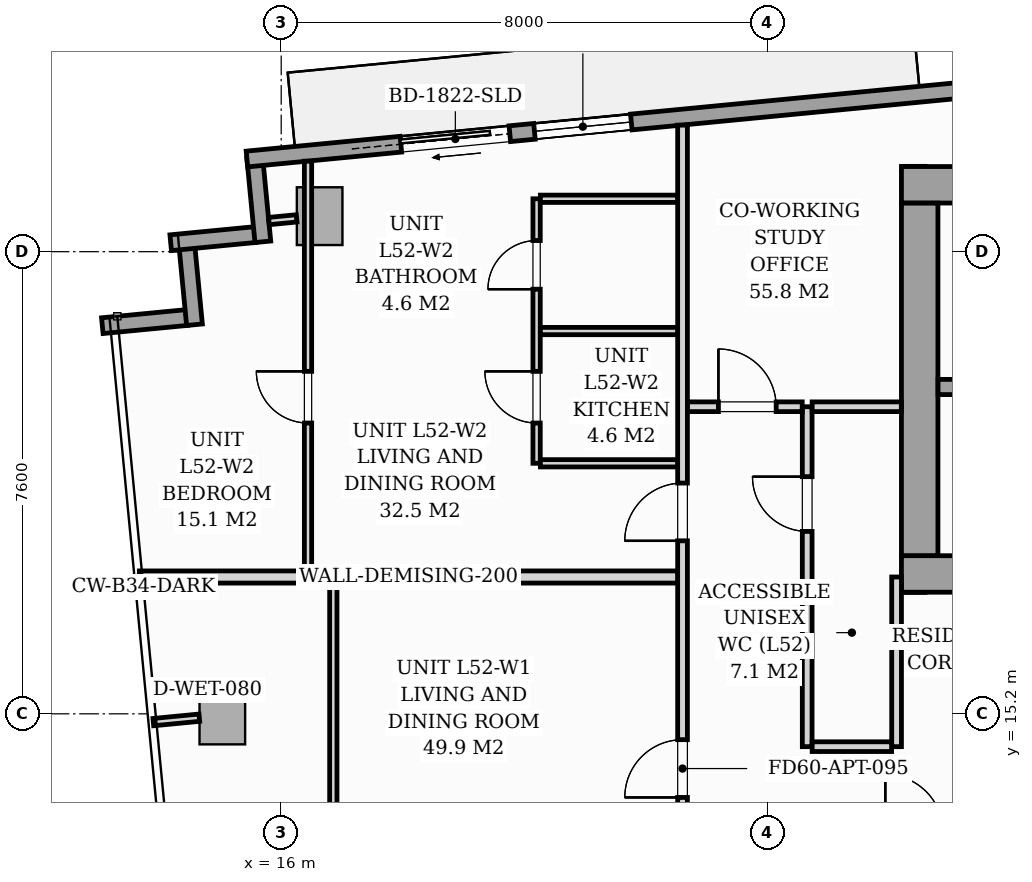
"""IFC4 building model, lengths in metres.
Left out: names, types, materials, properties, quantities, classifications, styles, units other than length and angle.
Written with IfcOpenShell. Run it as: python <this file> out.ifc"""

import sys

from ifc_helpers import new_model, si_unit, direction, frame, frame_2d, origin, origin_2d, place, context, subcontext, project, spatial, rectangle, i_section, extrude, source, transform, mapped, element, fill, save


model = new_model("IFC4")
c1 = context("Model", 3, precision=1e-05, world=origin(), true_north=direction((0.0, 1.0)))
c2 = subcontext(c1, "Body", "Model", "MODEL_VIEW")
j1 = project(units=[si_unit("LENGTHUNIT", "METRE"), si_unit("PLANEANGLEUNIT", "RADIAN")], contexts=[c1])
p1 = place(None, origin())
s1 = spatial("IfcSite", under=j1, at=p1, CompositionType="ELEMENT")
p2 = place(p1, origin())
s2 = spatial("IfcBuilding", under=s1, at=p2, CompositionType="ELEMENT")
p3 = place(p2, frame((0.0, 0.0, 182.6)))
s3 = spatial("IfcBuildingStorey", under=s2, at=p3, CompositionType="ELEMENT", Elevation=182.6)
m1 = source(origin(), c2, "Body", "SweptSolid", [
    extrude(i_section(OverallWidth=0.416, OverallDepth=0.446, WebThickness=0.039, FlangeThickness=0.063, FilletRadius=0.018, at=origin_2d()), origin(), (0.0, 0.0, 1.0), 3.196),
])
for number, where, z_axis, x_axis in (
    (1, (26.4, 17.4, 0.002), (0.0, 0.0, 1.0), (1.0, 0.0, 0.0)),
    (2, (26.4, 24.0, 0.002), (0.0, 0.0, 1.0), (1.0, 0.0, 0.0)),
):
    element("IfcColumn", number, at=place(p3, frame(where, z_axis=z_axis, x_axis=x_axis)), inside=s3, PredefinedType="PILASTER", context=c2, shape_type="MappedRepresentation", body=[
        mapped(m1, transform((0.0, 0.0, 0.0), scale=1.0)),
    ])
m2 = source(origin(), c2, "Body", "SweptSolid", [
    extrude(rectangle(XDim=0.75, YDim=0.95, at=origin_2d()), origin(), (0.0, 0.0, 1.0), 3.196),
])
for number, where, z_axis, x_axis in (
    (3, (16.632, 23.384, 0.002), (0.0, 0.0, 1.0), (0.995, 0.096, 0.0)),
    (4, (15.032, 15.173, 0.002), (0.0, 0.0, 1.0), (0.995, 0.096, 0.0)),
):
    element("IfcColumn", number, at=place(p3, frame(where, z_axis=z_axis, x_axis=x_axis)), inside=s3, PredefinedType="COLUMN", context=c2, shape_type="MappedRepresentation", body=[
        mapped(m2, transform((0.0, 0.0, 0.0), scale=1.0)),
    ])
p4 = place(p3, frame((13.058, 21.583, 0.0), z_axis=(0.0, 0.0, 1.0), x_axis=(0.99540774648, 0.095725744959, 0.0)))
e5 = element("IfcWall", 5, at=p4, inside=s3, PredefinedType="STANDARD", context=c2, shape_type="SweptSolid", body=[
    extrude(rectangle(XDim=1.395, YDim=0.26, at=frame_2d((0.698, 0.0))), origin(), (0.0, 0.0, 1.0), 2.94),
])
for number, where, z_axis, x_axis in (
    (6, (14.574, 21.599, 0.0), (0.0, 0.0, 1.0), (-0.096, 0.995, 0.0)),
    (7, (14.183, 22.947, 0.0), (0.0, 0.0, 1.0), (0.995, 0.096, 0.0)),
):
    element("IfcWall", number, at=place(p3, frame(where, z_axis=z_axis, x_axis=x_axis)), inside=s3, PredefinedType="STANDARD", context=c2, shape_type="SweptSolid", body=[
        extrude(rectangle(XDim=1.395, YDim=0.26, at=frame_2d((0.697, 0.0))), origin(), (0.0, 0.0, 1.0), 2.94),
    ])
p5 = place(p3, frame((15.698, 22.963, 0.0), z_axis=(0.0, 0.0, 1.0), x_axis=(-0.09589913835, 0.995391056452, 0.0)))
e8 = element("IfcWall", 8, at=p5, inside=s3, PredefinedType="STANDARD", context=c2, shape_type="SweptSolid", body=[
    extrude(rectangle(XDim=1.395, YDim=0.26, at=frame_2d((0.698, 0.0))), origin(), (0.0, 0.0, 1.0), 2.94),
])
p6 = place(p3, frame((15.437, 24.324, 0.0), z_axis=(0.0, 0.0, 1.0), x_axis=(0.995395627913, 0.095851676732, 0.0)))
e9 = element("IfcWall", 9, at=p6, inside=s3, PredefinedType="STANDARD", context=c2, shape_type="SweptSolid", body=[
    extrude(rectangle(XDim=16.1, YDim=0.26, at=frame_2d((8.05, 0.0))), origin(), (0.0, 0.0, 1.0), 2.94),
])
p7 = place(p6, frame((2.543, 0.0, 0.0)))
e10 = element("IfcOpeningElement", 10, at=p7, cuts=e9, PredefinedType="OPENING", context=c2, shape_type="SweptSolid", body=[
    extrude(rectangle(XDim=1.8, YDim=2.06, at=frame_2d((0.9, 1.03))), frame((0.0, 0.14, 0.0), z_axis=(0.0, -1.0, 0.0), x_axis=(1.0, 0.0, 0.0)), (0.0, 0.0, 1.0), 0.28),
])
p8 = place(p6, frame((4.75, 0.0, 0.65)))
e11 = element("IfcOpeningElement", 11, at=p8, cuts=e9, PredefinedType="OPENING", context=c2, shape_type="SweptSolid", body=[
    extrude(rectangle(XDim=1.6, YDim=1.5, at=frame_2d((0.8, 0.75))), frame((0.0, 0.14, 0.0), z_axis=(0.0, -1.0, 0.0), x_axis=(1.0, 0.0, 0.0)), (0.0, 0.0, 1.0), 0.28),
])
p9 = place(p3, frame((26.2, 17.5, 0.0), z_axis=(0.0, 0.0, 1.0), x_axis=(1.0, 0.0, 0.0)))
e12 = element("IfcWall", 12, at=p9, inside=s3, PredefinedType="SHEAR", context=c2, shape_type="SweptSolid", body=[
    extrude(rectangle(XDim=19.6, YDim=0.6, at=frame_2d((9.8, 0.0))), origin(), (0.0, 0.0, 1.0), 3.2),
])
p10 = place(p9, frame((0.95, 0.0, 0.0)))
e13 = element("IfcOpeningElement", 13, at=p10, cuts=e12, PredefinedType="OPENING", context=c2, shape_type="SweptSolid", body=[
    extrude(rectangle(XDim=0.95, YDim=2.06, at=frame_2d((0.475, 1.03))), frame((0.0, 0.31, 0.0), z_axis=(0.0, -1.0, 0.0), x_axis=(1.0, 0.0, 0.0)), (0.0, 0.0, 1.0), 0.62),
])
p11 = place(p9, frame((9.38, 0.0, 0.0)))
e14 = element("IfcOpeningElement", 14, at=p11, cuts=e12, PredefinedType="OPENING", context=c2, shape_type="SweptSolid", body=[
    extrude(rectangle(XDim=0.85, YDim=2.0, at=frame_2d((0.425, 1.0))), frame((0.0, 0.31, 0.0), z_axis=(0.0, -1.0, 0.0), x_axis=(1.0, 0.0, 0.0)), (0.0, 0.0, 1.0), 0.62),
])
p12 = place(p9, frame((17.55, 0.0, 0.0)))
e15 = element("IfcOpeningElement", 15, at=p12, cuts=e12, PredefinedType="OPENING", context=c2, shape_type="SweptSolid", body=[
    extrude(rectangle(XDim=0.95, YDim=2.06, at=frame_2d((0.475, 1.03))), frame((0.0, 0.31, 0.0), z_axis=(0.0, -1.0, 0.0), x_axis=(1.0, 0.0, 0.0)), (0.0, 0.0, 1.0), 0.62),
])
p13 = place(p3, frame((26.2, 23.9, 0.0), z_axis=(0.0, 0.0, 1.0), x_axis=(1.0, 0.0, 0.0)))
e16 = element("IfcWall", 16, at=p13, inside=s3, PredefinedType="SHEAR", context=c2, shape_type="SweptSolid", body=[
    extrude(rectangle(XDim=19.6, YDim=0.6, at=frame_2d((9.8, 0.0))), origin(), (0.0, 0.0, 1.0), 3.2),
])
p14 = place(p3, frame((26.5, 17.802, 0.0), z_axis=(0.0, 0.0, 1.0), x_axis=(0.0, 1.0, 0.0)))
e17 = element("IfcWall", 17, at=p14, inside=s3, PredefinedType="SHEAR", context=c2, shape_type="SweptSolid", body=[
    extrude(rectangle(XDim=5.796, YDim=0.6, at=frame_2d((2.898, 0.0))), origin(), (0.0, 0.0, 1.0), 3.2),
])
p15 = place(p3, frame((26.802, 20.575, 0.0), z_axis=(0.0, 0.0, 1.0), x_axis=(1.0, 0.0, 0.0)))
e18 = element("IfcWall", 18, at=p15, inside=s3, PredefinedType="SOLIDWALL", context=c2, shape_type="SweptSolid", body=[
    extrude(rectangle(XDim=8.148, YDim=0.25, at=frame_2d((4.074, 0.0))), origin(), (0.0, 0.0, 1.0), 3.2),
])
p16 = place(p15, frame((0.298, 0.0, 0.0)))
e19 = element("IfcOpeningElement", 19, at=p16, cuts=e18, PredefinedType="OPENING", context=c2, shape_type="SweptSolid", body=[
    extrude(rectangle(XDim=0.95, YDim=2.06, at=frame_2d((0.475, 1.03))), frame((0.0, 0.135, 0.0), z_axis=(0.0, -1.0, 0.0), x_axis=(1.0, 0.0, 0.0)), (0.0, 0.0, 1.0), 0.27),
])
p17 = place(p3, frame((22.6, 13.332, 0.0), z_axis=(0.0, 0.0, 1.0), x_axis=(0.0, 1.0, 0.0)))
e20 = element("IfcWall", 20, at=p17, inside=s3, PredefinedType="PARTITIONING", context=c2, shape_type="SweptSolid", body=[
    extrude(rectangle(XDim=11.549, YDim=0.16, at=frame_2d((5.774, 0.0))), origin(), (0.0, 0.0, 1.0), 2.94),
])
p18 = place(p17, frame((0.493, 0.0, 0.0)))
e21 = element("IfcOpeningElement", 21, at=p18, cuts=e20, PredefinedType="OPENING", context=c2, shape_type="SweptSolid", body=[
    extrude(rectangle(XDim=0.95, YDim=2.06, at=frame_2d((0.475, 1.03))), frame((0.0, 0.09, 0.0), z_axis=(0.0, -1.0, 0.0), x_axis=(1.0, 0.0, 0.0)), (0.0, 0.0, 1.0), 0.18),
])
p19 = place(p17, frame((4.713, 0.0, 0.0)))
e22 = element("IfcOpeningElement", 22, at=p19, cuts=e20, PredefinedType="OPENING", context=c2, shape_type="SweptSolid", body=[
    extrude(rectangle(XDim=0.95, YDim=2.06, at=frame_2d((0.475, 1.03))), frame((0.0, 0.09, 0.0), z_axis=(0.0, -1.0, 0.0), x_axis=(1.0, 0.0, 0.0)), (0.0, 0.0, 1.0), 0.18),
])
p20 = place(p3, frame((13.667, 17.45, 0.0), z_axis=(0.0, 0.0, 1.0), x_axis=(1.0, 0.0, 0.0)))
e23 = element("IfcWall", 23, at=p20, inside=s3, PredefinedType="PARTITIONING", context=c2, shape_type="SweptSolid", body=[
    extrude(rectangle(XDim=8.851, YDim=0.2, at=frame_2d((4.425, 0.0))), origin(), (0.0, 0.0, 1.0), 2.94),
])
p21 = place(p3, frame((16.857, 7.625, 0.0), z_axis=(0.0, 0.0, 1.0), x_axis=(0.0, 1.0, 0.0)))
e24 = element("IfcWall", 24, at=p21, inside=s3, PredefinedType="PARTITIONING", context=c2, shape_type="SweptSolid", body=[
    extrude(rectangle(XDim=9.723, YDim=0.12, at=frame_2d((4.861, 0.0))), origin(), (0.0, 0.0, 1.0), 2.94),
])
p22 = place(p21, frame((4.289, 0.0, 0.0)))
e25 = element("IfcOpeningElement", 25, at=p22, cuts=e24, PredefinedType="OPENING", context=c2, shape_type="SweptSolid", body=[
    extrude(rectangle(XDim=0.85, YDim=2.05, at=frame_2d((0.425, 1.025))), frame((0.0, 0.07, 0.0), z_axis=(0.0, -1.0, 0.0), x_axis=(1.0, 0.0, 0.0)), (0.0, 0.0, 1.0), 0.14),
])
p23 = place(p3, frame((20.2, 19.32, 0.0), z_axis=(0.0, 0.0, 1.0), x_axis=(0.0, 1.0, 0.0)))
e26 = element("IfcWall", 26, at=p23, inside=s3, PredefinedType="PARTITIONING", context=c2, shape_type="SweptSolid", body=[
    extrude(rectangle(XDim=4.35, YDim=0.12, at=frame_2d((2.175, 0.0))), origin(), (0.0, 0.0, 1.0), 2.94),
])
p24 = place(p23, frame((0.662, 0.0, 0.0)))
e27 = element("IfcOpeningElement", 27, at=p24, cuts=e26, PredefinedType="OPENING", context=c2, shape_type="SweptSolid", body=[
    extrude(rectangle(XDim=0.85, YDim=2.05, at=frame_2d((0.425, 1.025))), frame((0.0, 0.07, 0.0), z_axis=(0.0, -1.0, 0.0), x_axis=(1.0, 0.0, 0.0)), (0.0, 0.0, 1.0), 0.14),
])
p25 = place(p23, frame((2.863, 0.0, 0.0)))
e28 = element("IfcOpeningElement", 28, at=p25, cuts=e26, PredefinedType="OPENING", context=c2, shape_type="SweptSolid", body=[
    extrude(rectangle(XDim=0.8, YDim=2.02, at=frame_2d((0.4, 1.01))), frame((0.0, 0.07, 0.0), z_axis=(0.0, -1.0, 0.0), x_axis=(1.0, 0.0, 0.0)), (0.0, 0.0, 1.0), 0.14),
])
for number, where, z_axis, x_axis in (
    (29, (20.262, 21.495, 0.0), (0.0, 0.0, 1.0), (1.0, 0.0, 0.0)),
    (30, (20.262, 19.32, 0.0), (0.0, 0.0, 1.0), (1.0, 0.0, 0.0)),
):
    element("IfcWall", number, at=place(p3, frame(where, z_axis=z_axis, x_axis=x_axis)), inside=s3, PredefinedType="PARTITIONING", context=c2, shape_type="SweptSolid", body=[
        extrude(rectangle(XDim=2.256, YDim=0.12, at=frame_2d((1.128, 0.0))), origin(), (0.0, 0.0, 1.0), 2.94),
    ])
p26 = place(p3, frame((20.262, 23.67, 0.0), z_axis=(0.0, 0.0, 1.0), x_axis=(1.0, 0.0, 0.0)))
e31 = element("IfcWall", 31, at=p26, inside=s3, PredefinedType="PARTITIONING", context=c2, shape_type="SweptSolid", body=[
    extrude(rectangle(XDim=2.256, YDim=0.12, at=frame_2d((1.128, 0.0))), origin(), (0.0, 0.0, 1.0), 2.3),
])
p27 = place(p3, frame((16.441, 17.552, 0.0), z_axis=(0.0, 0.0, 1.0), x_axis=(0.0, 1.0, 0.0)))
e32 = element("IfcWall", 32, at=p27, inside=s3, PredefinedType="PARTITIONING", context=c2, shape_type="SweptSolid", body=[
    extrude(rectangle(XDim=6.736, YDim=0.12, at=frame_2d((3.368, 0.0))), origin(), (0.0, 0.0, 1.0), 2.382),
])
p28 = place(p27, frame((2.43, 0.0, 0.0)))
e33 = element("IfcOpeningElement", 33, at=p28, cuts=e32, PredefinedType="OPENING", context=c2, shape_type="SweptSolid", body=[
    extrude(rectangle(XDim=0.85, YDim=2.05, at=frame_2d((0.425, 1.025))), frame((0.0, 0.07, 0.0), z_axis=(0.0, -1.0, 0.0), x_axis=(1.0, 0.0, 0.0)), (0.0, 0.0, 1.0), 0.14),
])
p29 = place(p3, frame((24.65, 14.66, 0.0), z_axis=(0.0, 0.0, 1.0), x_axis=(0.0, 1.0, 0.0)))
e34 = element("IfcWall", 34, at=p29, inside=s3, PredefinedType="PARTITIONING", context=c2, shape_type="SweptSolid", body=[
    extrude(rectangle(XDim=5.59, YDim=0.16, at=frame_2d((2.795, 0.0))), origin(), (0.0, 0.0, 1.0), 2.94),
])
p30 = place(p29, frame((3.54, 0.0, 0.0)))
e35 = element("IfcOpeningElement", 35, at=p30, cuts=e34, PredefinedType="OPENING", context=c2, shape_type="SweptSolid", body=[
    extrude(rectangle(XDim=0.9, YDim=2.05, at=frame_2d((0.45, 1.025))), frame((0.0, 0.09, 0.0), z_axis=(0.0, -1.0, 0.0), x_axis=(1.0, 0.0, 0.0)), (0.0, 0.0, 1.0), 0.18),
])
p31 = place(p3, frame((22.682, 20.25, 0.0), z_axis=(0.0, 0.0, 1.0), x_axis=(1.0, 0.0, 0.0)))
e36 = element("IfcWall", 36, at=p31, inside=s3, PredefinedType="PARTITIONING", context=c2, shape_type="SweptSolid", body=[
    extrude(rectangle(XDim=1.886, YDim=0.16, at=frame_2d((0.943, 0.0))), origin(), (0.0, 0.0, 1.0), 2.94),
])
p32 = place(p31, frame((0.508, 0.0, 0.0)))
e37 = element("IfcOpeningElement", 37, at=p32, cuts=e36, PredefinedType="OPENING", context=c2, shape_type="SweptSolid", body=[
    extrude(rectangle(XDim=0.95, YDim=2.06, at=frame_2d((0.475, 1.03))), frame((0.0, 0.09, 0.0), z_axis=(0.0, -1.0, 0.0), x_axis=(1.0, 0.0, 0.0)), (0.0, 0.0, 1.0), 0.18),
])
p33 = place(p3, frame((24.732, 20.25, 0.0), z_axis=(0.0, 0.0, 1.0), x_axis=(1.0, 0.0, 0.0)))
e38 = element("IfcWall", 38, at=p33, inside=s3, PredefinedType="PARTITIONING", context=c2, shape_type="SweptSolid", body=[
    extrude(rectangle(XDim=1.466, YDim=0.16, at=frame_2d((0.733, 0.0))), origin(), (0.0, 0.0, 1.0), 2.94),
])
p34 = place(p3, frame((26.12, 14.66, 0.0), z_axis=(0.0, 0.0, 1.0), x_axis=(0.0, 1.0, 0.0)))
e39 = element("IfcWall", 39, at=p34, inside=s3, PredefinedType="PARTITIONING", context=c2, shape_type="SweptSolid", body=[
    extrude(rectangle(XDim=2.79, YDim=0.16, at=frame_2d((1.395, 0.0))), origin(), (0.0, 0.0, 1.0), 2.94),
])
p35 = place(p3, frame((24.732, 14.66, 0.0), z_axis=(0.0, 0.0, 1.0), x_axis=(1.0, 0.0, 0.0)))
e40 = element("IfcWall", 40, at=p35, inside=s3, PredefinedType="PARTITIONING", context=c2, shape_type="SweptSolid", body=[
    extrude(rectangle(XDim=1.306, YDim=0.16, at=frame_2d((0.653, 0.0))), origin(), (0.0, 0.0, 1.0), 2.94),
])
p36 = place(p3, frame((16.254, 23.348, 0.0), z_axis=(0.0, 0.0, 1.0), x_axis=(-0.995384576284, -0.09596637586, 0.0)))
e41 = element("IfcWall", 41, at=p36, inside=s3, PredefinedType="PARTITIONING", context=c2, shape_type="SweptSolid", body=[
    extrude(rectangle(XDim=0.458, YDim=0.12, at=frame_2d((0.229, 0.0))), origin(), (0.0, 0.0, 1.0), 2.94),
])
p37 = place(p3, frame((14.654, 15.136, 0.0), z_axis=(0.0, 0.0, 1.0), x_axis=(-0.995408440582, -0.095718527039, 0.0)))
e42 = element("IfcWall", 42, at=p37, inside=s3, PredefinedType="PARTITIONING", context=c2, shape_type="SweptSolid", body=[
    extrude(rectangle(XDim=0.76, YDim=0.12, at=frame_2d((0.38, 0.0))), origin(), (0.0, 0.0, 1.0), 2.94),
])
m3 = source(origin(), c2, "Body", "SweptSolid", [
    extrude(rectangle(XDim=1.8, YDim=2.06, at=frame_2d((0.9, 1.03))), frame((0.0, 0.025, 0.0), z_axis=(0.0, -1.0, 0.0), x_axis=(1.0, 0.0, 0.0)), (0.0, 0.0, 1.0), 0.05),
])
p38 = place(p7, origin())
e43 = element("IfcDoor", 43, at=p38, inside=s3, OperationType="SLIDING_TO_LEFT", PredefinedType="DOOR", context=c2, shape_type="MappedRepresentation", body=[
    mapped(m3, transform((0.0, 0.0, 0.0), scale=1.0)),
])
fill(e10, e43)
m4 = source(origin(), c2, "Body", "SweptSolid", [
    extrude(rectangle(XDim=1.6, YDim=1.5, at=frame_2d((0.8, 0.75))), frame((0.0, 0.03, 0.0), z_axis=(0.0, -1.0, 0.0), x_axis=(1.0, 0.0, 0.0)), (0.0, 0.0, 1.0), 0.06),
])
p39 = place(p8, origin())
e44 = element("IfcWindow", 44, at=p39, inside=s3, PartitioningType="SINGLE_PANEL", PredefinedType="WINDOW", context=c2, shape_type="MappedRepresentation", body=[
    mapped(m4, transform((0.0, 0.0, 0.0), scale=1.0)),
])
fill(e11, e44)
m5 = source(origin(), c2, "Body", "SweptSolid", [
    extrude(rectangle(XDim=0.95, YDim=2.06, at=frame_2d((0.475, 1.03))), frame((0.0, 0.025, 0.0), z_axis=(0.0, -1.0, 0.0), x_axis=(1.0, 0.0, 0.0)), (0.0, 0.0, 1.0), 0.05),
])
p40 = place(p18, origin())
e45 = element("IfcDoor", 45, at=p40, inside=s3, OperationType="SINGLE_SWING_LEFT", PredefinedType="DOOR", context=c2, shape_type="MappedRepresentation", body=[
    mapped(m5, transform((0.0, 0.0, 0.0), scale=1.0)),
])
fill(e21, e45)
p41 = place(p19, origin())
e46 = element("IfcDoor", 46, at=p41, inside=s3, OperationType="SINGLE_SWING_LEFT", PredefinedType="DOOR", context=c2, shape_type="MappedRepresentation", body=[
    mapped(m5, transform((0.0, 0.0, 0.0), scale=1.0)),
])
fill(e22, e46)
m6 = source(origin(), c2, "Body", "SweptSolid", [
    extrude(rectangle(XDim=0.85, YDim=2.05, at=frame_2d((0.425, 1.025))), frame((0.0, 0.025, 0.0), z_axis=(0.0, -1.0, 0.0), x_axis=(1.0, 0.0, 0.0)), (0.0, 0.0, 1.0), 0.05),
])
p42 = place(p24, origin())
e47 = element("IfcDoor", 47, at=p42, inside=s3, OperationType="SINGLE_SWING_RIGHT", PredefinedType="DOOR", context=c2, shape_type="MappedRepresentation", body=[
    mapped(m6, transform((0.0, 0.0, 0.0), scale=1.0)),
])
fill(e27, e47)
m7 = source(origin(), c2, "Body", "SweptSolid", [
    extrude(rectangle(XDim=0.8, YDim=2.02, at=frame_2d((0.4, 1.01))), frame((0.0, 0.025, 0.0), z_axis=(0.0, -1.0, 0.0), x_axis=(1.0, 0.0, 0.0)), (0.0, 0.0, 1.0), 0.05),
])
p43 = place(p25, origin())
e48 = element("IfcDoor", 48, at=p43, inside=s3, OperationType="SINGLE_SWING_LEFT", PredefinedType="DOOR", context=c2, shape_type="MappedRepresentation", body=[
    mapped(m7, transform((0.0, 0.0, 0.0), scale=1.0)),
])
fill(e28, e48)
p44 = place(p28, origin())
e49 = element("IfcDoor", 49, at=p44, inside=s3, OperationType="SINGLE_SWING_RIGHT", PredefinedType="DOOR", context=c2, shape_type="MappedRepresentation", body=[
    mapped(m6, transform((0.0, 0.0, 0.0), scale=1.0)),
])
fill(e33, e49)
m8 = source(origin(), c2, "Body", "SweptSolid", [
    extrude(rectangle(XDim=0.9, YDim=2.05, at=frame_2d((0.45, 1.025))), frame((0.0, 0.025, 0.0), z_axis=(0.0, -1.0, 0.0), x_axis=(1.0, 0.0, 0.0)), (0.0, 0.0, 1.0), 0.05),
])
p45 = place(p30, origin())
e50 = element("IfcDoor", 50, at=p45, inside=s3, OperationType="SINGLE_SWING_RIGHT", PredefinedType="DOOR", context=c2, shape_type="MappedRepresentation", body=[
    mapped(m8, transform((0.0, 0.0, 0.0), scale=1.0)),
])
fill(e35, e50)
p46 = place(p32, origin())
e51 = element("IfcDoor", 51, at=p46, inside=s3, OperationType="SINGLE_SWING_LEFT", PredefinedType="DOOR", context=c2, shape_type="MappedRepresentation", body=[
    mapped(m5, transform((0.0, 0.0, 0.0), scale=1.0)),
])
fill(e37, e51)
save(model, sys.argv[1])
